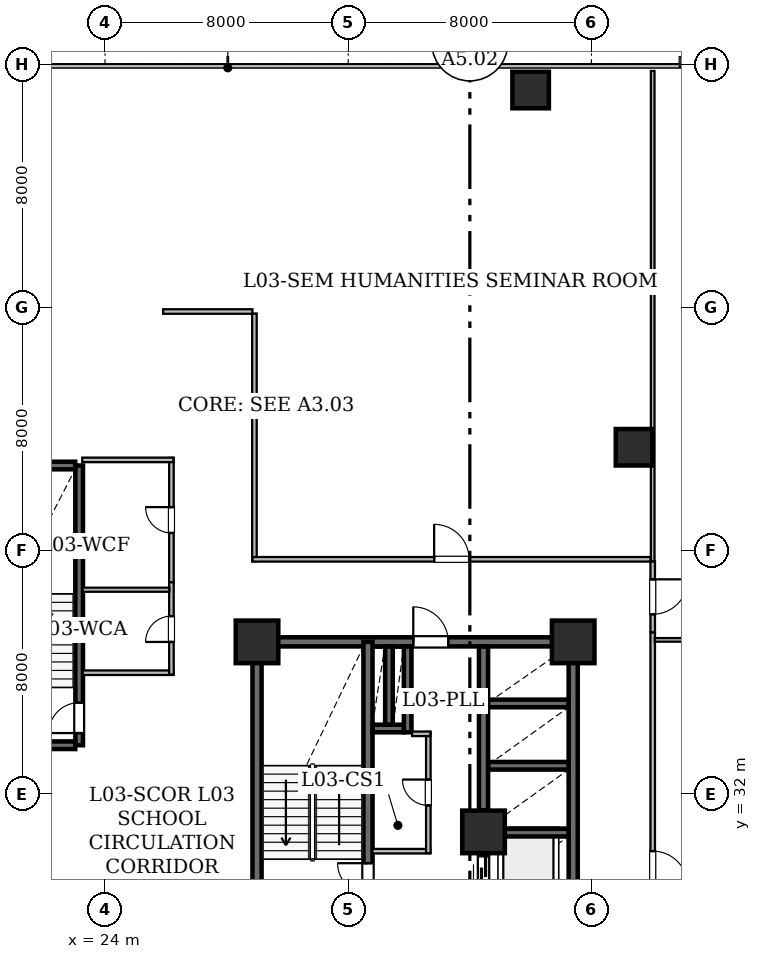
"""IFC4 building model, lengths in metres.
Left out: names, types, materials, properties, quantities, classifications, styles, units other than length and angle.
Written with IfcOpenShell. Run it as: python <this file> out.ifc"""

import sys

from ifc_helpers import new_model, si_unit, direction, frame, frame_2d, origin, origin_2d, place, context, subcontext, project, spatial, rectangle, hollow_rectangle, extrude, element, fill, save


model = new_model("IFC4")
c1 = context("Model", 3, precision=1e-05, world=origin(), true_north=direction((0.0, 1.0)))
c2 = subcontext(c1, "Body", "Model", "MODEL_VIEW")
j1 = project(units=[si_unit("LENGTHUNIT", "METRE"), si_unit("PLANEANGLEUNIT", "RADIAN")], contexts=[c1])
p1 = place(None, origin())
s1 = spatial("IfcSite", under=j1, at=p1, CompositionType="ELEMENT")
p2 = place(p1, origin())
s2 = spatial("IfcBuilding", under=s1, at=p2, CompositionType="ELEMENT")
p3 = place(p2, frame((0.0, 0.0, 16.2)))
s3 = spatial("IfcBuildingStorey", under=s2, at=p3, CompositionType="ELEMENT", Elevation=16.2)
for number, where, z_axis, x_axis in (
    (1, (29.0, 37.0, 0.0), (0.0, 0.0, 1.0), (1.0, 0.0, 0.0)),
    (2, (36.45, 30.75, 0.0), (0.0, 0.0, 1.0), (1.0, 0.0, 0.0)),
    (3, (39.4, 37.0, 0.0), (0.0, 0.0, 1.0), (1.0, 0.0, 0.0)),
):
    element("IfcColumn", number, at=place(p3, frame(where, z_axis=z_axis, x_axis=x_axis)), inside=s3, PredefinedType="COLUMN", context=c2, shape_type="SweptSolid", body=[
        extrude(hollow_rectangle(XDim=1.4, YDim=1.4, WallThickness=0.07, at=origin_2d()), origin(), (0.0, 0.0, 1.0), 4.2),
    ])
for number, where, z_axis, x_axis in (
    (4, (38.0, 55.15, 0.0), (0.0, 0.0, 1.0), (1.0, 0.0, 0.0)),
    (5, (41.4, 43.4, 0.0), (0.0, 0.0, 1.0), (1.0, 0.0, 0.0)),
):
    element("IfcColumn", number, at=place(p3, frame(where, z_axis=z_axis, x_axis=x_axis)), inside=s3, PredefinedType="COLUMN", context=c2, shape_type="SweptSolid", body=[
        extrude(hollow_rectangle(XDim=1.2, YDim=1.2, WallThickness=0.06, at=origin_2d()), origin(), (0.0, 0.0, 1.0), 4.2),
    ])
p4 = place(p3, frame((29.0, 28.0, 0.0), z_axis=(0.0, 0.0, 1.0), x_axis=(0.0, 1.0, 0.0)))
e6 = element("IfcWall", 6, at=p4, inside=s3, PredefinedType="SHEAR", context=c2, shape_type="SweptSolid", body=[
    extrude(rectangle(XDim=9.0, YDim=0.3, at=frame_2d((4.5, 0.0))), origin(), (0.0, 0.0, 1.0), 3.92),
])
p5 = place(p3, frame((29.0, 37.0, 0.0), z_axis=(0.0, 0.0, 1.0), x_axis=(1.0, 0.0, 0.0)))
e7 = element("IfcWall", 7, at=p5, inside=s3, PredefinedType="SHEAR", context=c2, shape_type="SweptSolid", body=[
    extrude(rectangle(XDim=10.4, YDim=0.3, at=frame_2d((5.2, 0.0))), origin(), (0.0, 0.0, 1.0), 3.92),
])
p6 = place(p5, frame((5.14, 0.0, 0.0)))
e8 = element("IfcOpeningElement", 8, at=p6, cuts=e7, PredefinedType="OPENING", context=c2, shape_type="SweptSolid", body=[
    extrude(rectangle(XDim=1.15, YDim=2.2, at=frame_2d((0.575, 1.1))), frame((0.0, 0.16, 0.0), z_axis=(0.0, -1.0, 0.0), x_axis=(1.0, 0.0, 0.0)), (0.0, 0.0, 1.0), 0.32),
])
p7 = place(p3, frame((39.4, 24.4, 0.0), z_axis=(0.0, 0.0, 1.0), x_axis=(0.0, 1.0, 0.0)))
e9 = element("IfcWall", 9, at=p7, inside=s3, PredefinedType="SHEAR", context=c2, shape_type="SweptSolid", body=[
    extrude(rectangle(XDim=12.6, YDim=0.3, at=frame_2d((6.3, 0.0))), origin(), (0.0, 0.0, 1.0), 3.92),
])
p8 = place(p3, frame((32.65, 28.0, 0.0), z_axis=(0.0, 0.0, 1.0), x_axis=(0.0, 1.0, 0.0)))
e10 = element("IfcWall", 10, at=p8, inside=s3, PredefinedType="SHEAR", context=c2, shape_type="SweptSolid", body=[
    extrude(rectangle(XDim=9.0, YDim=0.3, at=frame_2d((4.5, 0.0))), origin(), (0.0, 0.0, 1.0), 3.92),
])
p9 = place(p8, frame((0.72, 0.0, 0.0)))
e11 = element("IfcOpeningElement", 11, at=p9, cuts=e10, PredefinedType="OPENING", context=c2, shape_type="SweptSolid", body=[
    extrude(rectangle(XDim=1.0, YDim=2.15, at=frame_2d((0.5, 1.075))), frame((0.0, 0.16, 0.0), z_axis=(0.0, -1.0, 0.0), x_axis=(1.0, 0.0, 0.0)), (0.0, 0.0, 1.0), 0.32),
])
p10 = place(p3, frame((36.45, 25.1, 0.0), z_axis=(0.0, 0.0, 1.0), x_axis=(0.0, 1.0, 0.0)))
e12 = element("IfcWall", 12, at=p10, inside=s3, PredefinedType="SHEAR", context=c2, shape_type="SweptSolid", body=[
    extrude(rectangle(XDim=4.95, YDim=0.3, at=frame_2d((2.475, 0.0))), origin(), (0.0, 0.0, 1.0), 3.92),
])
p11 = place(p10, frame((0.12, 0.0, 0.0)))
e13 = element("IfcOpeningElement", 13, at=p11, cuts=e12, PredefinedType="OPENING", context=c2, shape_type="SweptSolid", body=[
    extrude(rectangle(XDim=1.05, YDim=2.15, at=frame_2d((0.525, 1.075))), frame((0.0, 0.16, 0.0), z_axis=(0.0, -1.0, 0.0), x_axis=(1.0, 0.0, 0.0)), (0.0, 0.0, 1.0), 0.32),
])
p12 = place(p10, frame((1.995, 0.0, 0.0)))
e14 = element("IfcOpeningElement", 14, at=p12, cuts=e12, PredefinedType="OPENING", context=c2, shape_type="SweptSolid", body=[
    extrude(rectangle(XDim=1.05, YDim=2.15, at=frame_2d((0.525, 1.075))), frame((0.0, 0.16, 0.0), z_axis=(0.0, -1.0, 0.0), x_axis=(1.0, 0.0, 0.0)), (0.0, 0.0, 1.0), 0.32),
])
p13 = place(p10, frame((3.795, 0.0, 0.0)))
e15 = element("IfcOpeningElement", 15, at=p13, cuts=e12, PredefinedType="OPENING", context=c2, shape_type="SweptSolid", body=[
    extrude(rectangle(XDim=1.05, YDim=2.15, at=frame_2d((0.525, 1.075))), frame((0.0, 0.16, 0.0), z_axis=(0.0, -1.0, 0.0), x_axis=(1.0, 0.0, 0.0)), (0.0, 0.0, 1.0), 0.32),
])
p14 = place(p3, frame((36.45, 31.45, 0.0), z_axis=(0.0, 0.0, 1.0), x_axis=(0.0, 1.0, 0.0)))
e16 = element("IfcWall", 16, at=p14, inside=s3, PredefinedType="SHEAR", context=c2, shape_type="SweptSolid", body=[
    extrude(rectangle(XDim=5.396, YDim=0.3, at=frame_2d((2.698, 0.0))), origin(), (0.0, 0.0, 1.0), 3.92),
])
for number, where, z_axis, x_axis in (
    (17, (36.604, 30.725, 0.0), (0.0, 0.0, 1.0), (1.0, 0.0, 0.0)),
    (18, (36.604, 32.925, 0.0), (0.0, 0.0, 1.0), (1.0, 0.0, 0.0)),
    (19, (36.604, 34.975, 0.0), (0.0, 0.0, 1.0), (1.0, 0.0, 0.0)),
):
    element("IfcWall", number, at=place(p3, frame(where, z_axis=z_axis, x_axis=x_axis)), inside=s3, PredefinedType="SHEAR", context=c2, shape_type="SweptSolid", body=[
        extrude(rectangle(XDim=2.642, YDim=0.25, at=frame_2d((1.321, 0.0))), origin(), (0.0, 0.0, 1.0), 3.92),
    ])
p15 = place(p3, frame((33.955, 34.025, 0.0), z_axis=(0.0, 0.0, 1.0), x_axis=(0.0, 1.0, 0.0)))
e20 = element("IfcWall", 20, at=p15, inside=s3, PredefinedType="SHEAR", context=c2, shape_type="SweptSolid", body=[
    extrude(rectangle(XDim=2.821, YDim=0.25, at=frame_2d((1.411, 0.0))), origin(), (0.0, 0.0, 1.0), 3.92),
])
p16 = place(p3, frame((32.804, 34.15, 0.0), z_axis=(0.0, 0.0, 1.0), x_axis=(1.0, 0.0, 0.0)))
e21 = element("IfcWall", 21, at=p16, inside=s3, PredefinedType="SHEAR", context=c2, shape_type="SweptSolid", body=[
    extrude(rectangle(XDim=1.022, YDim=0.25, at=frame_2d((0.511, 0.0))), origin(), (0.0, 0.0, 1.0), 3.92),
])
p17 = place(p3, frame((33.34, 34.279, 0.0), z_axis=(0.0, 0.0, 1.0), x_axis=(0.0, 1.0, 0.0)))
e22 = element("IfcWall", 22, at=p17, inside=s3, PredefinedType="SHEAR", context=c2, shape_type="SweptSolid", body=[
    extrude(rectangle(XDim=2.567, YDim=0.25, at=frame_2d((1.283, 0.0))), origin(), (0.0, 0.0, 1.0), 3.92),
])
p18 = place(p3, frame((23.15, 33.6, 0.0), z_axis=(0.0, 0.0, 1.0), x_axis=(0.0, 1.0, 0.0)))
e23 = element("IfcWall", 23, at=p18, inside=s3, PredefinedType="SHEAR", context=c2, shape_type="SweptSolid", body=[
    extrude(rectangle(XDim=9.2, YDim=0.25, at=frame_2d((4.6, 0.0))), origin(), (0.0, 0.0, 1.0), 3.92),
])
p19 = place(p18, frame((0.4, 0.0, 0.0)))
e24 = element("IfcOpeningElement", 24, at=p19, cuts=e23, PredefinedType="OPENING", context=c2, shape_type="SweptSolid", body=[
    extrude(rectangle(XDim=1.0, YDim=2.15, at=frame_2d((0.5, 1.075))), frame((0.0, 0.135, 0.0), z_axis=(0.0, -1.0, 0.0), x_axis=(1.0, 0.0, 0.0)), (0.0, 0.0, 1.0), 0.27),
])
for number, where, z_axis, x_axis in (
    (25, (19.329, 33.6, 0.0), (0.0, 0.0, 1.0), (1.0, 0.0, 0.0)),
    (26, (19.329, 42.8, 0.0), (0.0, 0.0, 1.0), (1.0, 0.0, 0.0)),
):
    element("IfcWall", number, at=place(p3, frame(where, z_axis=z_axis, x_axis=x_axis)), inside=s3, PredefinedType="SHEAR", context=c2, shape_type="SweptSolid", body=[
        extrude(rectangle(XDim=3.692, YDim=0.25, at=frame_2d((1.846, 0.0))), origin(), (0.0, 0.0, 1.0), 3.92),
    ])
p20 = place(p3, frame((32.794, 30.115, 0.0), z_axis=(0.0, 0.0, 1.0), x_axis=(1.0, 0.0, 0.0)))
e27 = element("IfcWall", 27, at=p20, inside=s3, PredefinedType="STANDARD", context=c2, shape_type="SweptSolid", body=[
    extrude(rectangle(XDim=1.906, YDim=0.15, at=frame_2d((0.953, 0.0))), origin(), (0.0, 0.0, 1.0), 3.377),
])
p21 = place(p3, frame((34.635, 30.052, 0.0), z_axis=(0.0, 0.0, 1.0), x_axis=(0.0, 1.0, 0.0)))
e28 = element("IfcWall", 28, at=p21, inside=s3, PredefinedType="STANDARD", context=c2, shape_type="SweptSolid", body=[
    extrude(rectangle(XDim=3.988, YDim=0.15, at=frame_2d((1.994, 0.0))), origin(), (0.0, 0.0, 1.0), 3.92),
])
p22 = place(p21, frame((1.569, 0.0, 0.0)))
e29 = element("IfcOpeningElement", 29, at=p22, cuts=e28, PredefinedType="OPENING", context=c2, shape_type="SweptSolid", body=[
    extrude(rectangle(XDim=0.85, YDim=2.1, at=frame_2d((0.425, 1.05))), frame((0.0, 0.085, 0.0), z_axis=(0.0, -1.0, 0.0), x_axis=(1.0, 0.0, 0.0)), (0.0, 0.0, 1.0), 0.17),
])
p23 = place(p3, frame((34.7, 33.975, 0.0), z_axis=(0.0, 0.0, 1.0), x_axis=(-1.0, 0.0, 0.0)))
e30 = element("IfcWall", 30, at=p23, inside=s3, PredefinedType="STANDARD", context=c2, shape_type="SweptSolid", body=[
    extrude(rectangle(XDim=0.6, YDim=0.15, at=frame_2d((0.3, 0.0))), origin(), (0.0, 0.0, 1.0), 3.92),
])
p24 = place(p3, frame((23.267, 35.985, 0.0), z_axis=(0.0, 0.0, 1.0), x_axis=(1.0, 0.0, 0.0)))
e31 = element("IfcWall", 31, at=p24, inside=s3, PredefinedType="STANDARD", context=c2, shape_type="SweptSolid", body=[
    extrude(rectangle(XDim=2.983, YDim=0.15, at=frame_2d((1.491, 0.0))), origin(), (0.0, 0.0, 1.0), 3.92),
])
p25 = place(p3, frame((26.185, 35.922, 0.0), z_axis=(0.0, 0.0, 1.0), x_axis=(0.0, 1.0, 0.0)))
e32 = element("IfcWall", 32, at=p25, inside=s3, PredefinedType="STANDARD", context=c2, shape_type="SweptSolid", body=[
    extrude(rectangle(XDim=3.042, YDim=0.15, at=frame_2d((1.521, 0.0))), origin(), (0.0, 0.0, 1.0), 3.92),
])
p26 = place(p25, frame((1.075, 0.0, 0.0)))
e33 = element("IfcOpeningElement", 33, at=p26, cuts=e32, PredefinedType="OPENING", context=c2, shape_type="SweptSolid", body=[
    extrude(rectangle(XDim=0.85, YDim=2.1, at=frame_2d((0.425, 1.05))), frame((0.0, 0.085, 0.0), z_axis=(0.0, -1.0, 0.0), x_axis=(1.0, 0.0, 0.0)), (0.0, 0.0, 1.0), 0.17),
])
p27 = place(p3, frame((26.185, 38.964, 0.0), z_axis=(0.0, 0.0, 1.0), x_axis=(0.0, 1.0, 0.0)))
e34 = element("IfcWall", 34, at=p27, inside=s3, PredefinedType="STANDARD", context=c2, shape_type="SweptSolid", body=[
    extrude(rectangle(XDim=4.086, YDim=0.15, at=frame_2d((2.043, 0.0))), origin(), (0.0, 0.0, 1.0), 3.92),
])
p28 = place(p27, frame((1.618, 0.0, 0.0)))
e35 = element("IfcOpeningElement", 35, at=p28, cuts=e34, PredefinedType="OPENING", context=c2, shape_type="SweptSolid", body=[
    extrude(rectangle(XDim=0.85, YDim=2.1, at=frame_2d((0.425, 1.05))), frame((0.0, 0.085, 0.0), z_axis=(0.0, -1.0, 0.0), x_axis=(1.0, 0.0, 0.0)), (0.0, 0.0, 1.0), 0.17),
])
p29 = place(p3, frame((26.25, 42.985, 0.0), z_axis=(0.0, 0.0, 1.0), x_axis=(-1.0, 0.0, 0.0)))
e36 = element("IfcWall", 36, at=p29, inside=s3, PredefinedType="STANDARD", context=c2, shape_type="SweptSolid", body=[
    extrude(rectangle(XDim=3.0, YDim=0.15, at=frame_2d((1.5, 0.0))), origin(), (0.0, 0.0, 1.0), 3.92),
])
p30 = place(p3, frame((42.015, 37.314, 0.0), z_axis=(0.0, 0.0, 1.0), x_axis=(0.0, -1.0, 0.0)))
e37 = element("IfcWall", 37, at=p30, inside=s3, PredefinedType="STANDARD", context=c2, shape_type="SweptSolid", body=[
    extrude(rectangle(XDim=15.5, YDim=0.15, at=frame_2d((7.75, 0.0))), origin(), (0.0, 0.0, 1.0), 3.055),
])
p31 = place(p30, frame((7.196, 0.0, 0.0)))
e38 = element("IfcOpeningElement", 38, at=p31, cuts=e37, PredefinedType="OPENING", context=c2, shape_type="SweptSolid", body=[
    extrude(rectangle(XDim=1.15, YDim=2.2, at=frame_2d((0.575, 1.1))), frame((0.0, 0.085, 0.0), z_axis=(0.0, -1.0, 0.0), x_axis=(1.0, 0.0, 0.0)), (0.0, 0.0, 1.0), 0.17),
])
p32 = place(p3, frame((42.015, 39.65, 0.0), z_axis=(0.0, 0.0, 1.0), x_axis=(0.0, -1.0, 0.0)))
e39 = element("IfcWall", 39, at=p32, inside=s3, PredefinedType="STANDARD", context=c2, shape_type="SweptSolid", body=[
    extrude(rectangle(XDim=2.336, YDim=0.15, at=frame_2d((1.168, 0.0))), origin(), (0.0, 0.0, 1.0), 3.447),
])
p33 = place(p32, frame((0.593, 0.0, 0.0)))
e40 = element("IfcOpeningElement", 40, at=p33, cuts=e39, PredefinedType="OPENING", context=c2, shape_type="SweptSolid", body=[
    extrude(rectangle(XDim=1.15, YDim=2.2, at=frame_2d((0.575, 1.1))), frame((0.0, 0.085, 0.0), z_axis=(0.0, -1.0, 0.0), x_axis=(1.0, 0.0, 0.0)), (0.0, 0.0, 1.0), 0.17),
])
p34 = place(p3, frame((25.911, 47.865, 0.0), z_axis=(0.0, 0.0, 1.0), x_axis=(1.0, 0.0, 0.0)))
e41 = element("IfcWall", 41, at=p34, inside=s3, PredefinedType="STANDARD", context=c2, shape_type="SweptSolid", body=[
    extrude(rectangle(XDim=2.939, YDim=0.15, at=frame_2d((1.47, 0.0))), origin(), (0.0, 0.0, 1.0), 3.92),
])
p35 = place(p3, frame((28.915, 47.8, 0.0), z_axis=(0.0, 0.0, 1.0), x_axis=(0.0, -1.0, 0.0)))
e42 = element("IfcWall", 42, at=p35, inside=s3, PredefinedType="STANDARD", context=c2, shape_type="SweptSolid", body=[
    extrude(rectangle(XDim=8.15, YDim=0.15, at=frame_2d((4.075, 0.0))), origin(), (0.0, 0.0, 1.0), 3.055),
])
p36 = place(p3, frame((28.852, 39.715, 0.0), z_axis=(0.0, 0.0, 1.0), x_axis=(1.0, 0.0, 0.0)))
e43 = element("IfcWall", 43, at=p36, inside=s3, PredefinedType="STANDARD", context=c2, shape_type="SweptSolid", body=[
    extrude(rectangle(XDim=13.098, YDim=0.15, at=frame_2d((6.549, 0.0))), origin(), (0.0, 0.0, 1.0), 3.055),
])
p37 = place(p36, frame((5.974, 0.0, 0.0)))
e44 = element("IfcOpeningElement", 44, at=p37, cuts=e43, PredefinedType="OPENING", context=c2, shape_type="SweptSolid", body=[
    extrude(rectangle(XDim=1.15, YDim=2.2, at=frame_2d((0.575, 1.1))), frame((0.0, 0.085, 0.0), z_axis=(0.0, -1.0, 0.0), x_axis=(1.0, 0.0, 0.0)), (0.0, 0.0, 1.0), 0.17),
])
p38 = place(p3, frame((23.267, 38.715, 0.0), z_axis=(0.0, 0.0, 1.0), x_axis=(1.0, 0.0, 0.0)))
e45 = element("IfcWall", 45, at=p38, inside=s3, PredefinedType="PARTITIONING", context=c2, shape_type="SweptSolid", body=[
    extrude(rectangle(XDim=2.851, YDim=0.135, at=frame_2d((1.425, 0.0))), origin(), (0.0, 0.0, 1.0), 3.92),
])
p39 = place(p3, frame((42.082, 37.065, 0.0), z_axis=(0.0, 0.0, 1.0), x_axis=(1.0, 0.0, 0.0)))
e46 = element("IfcWall", 46, at=p39, inside=s3, PredefinedType="PARTITIONING", context=c2, shape_type="SweptSolid", body=[
    extrude(rectangle(XDim=13.686, YDim=0.12, at=frame_2d((6.843, 0.0))), origin(), (0.0, 0.0, 1.0), 3.055),
])
p40 = place(p3, frame((42.015, 39.65, 0.0), z_axis=(0.0, 0.0, 1.0), x_axis=(0.0, 1.0, 0.0)))
e47 = element("IfcWall", 47, at=p40, inside=s3, PredefinedType="PARTITIONING", context=c2, shape_type="SweptSolid", body=[
    extrude(rectangle(XDim=16.128, YDim=0.12, at=frame_2d((8.064, 0.0))), origin(), (0.0, 0.0, 1.0), 3.055),
])
p41 = place(p9, origin())
e48 = element("IfcDoor", 48, at=p41, inside=s3, OperationType="SINGLE_SWING_RIGHT", PredefinedType="DOOR", context=c2, shape_type="SweptSolid", body=[
    extrude(rectangle(XDim=1.0, YDim=2.15, at=frame_2d((0.5, 1.075))), frame((0.0, 0.025, 0.0), z_axis=(0.0, -1.0, 0.0), x_axis=(1.0, 0.0, 0.0)), (0.0, 0.0, 1.0), 0.05),
])
fill(e11, e48)
p42 = place(p6, origin())
e49 = element("IfcDoor", 49, at=p42, inside=s3, OperationType="SINGLE_SWING_LEFT", PredefinedType="DOOR", context=c2, shape_type="SweptSolid", body=[
    extrude(rectangle(XDim=1.15, YDim=2.2, at=frame_2d((0.575, 1.1))), frame((0.0, 0.025, 0.0), z_axis=(0.0, -1.0, 0.0), x_axis=(1.0, 0.0, 0.0)), (0.0, 0.0, 1.0), 0.05),
])
fill(e8, e49)
p43 = place(p13, origin())
e50 = element("IfcDoor", 50, at=p43, inside=s3, OperationType="SLIDING_TO_LEFT", PredefinedType="DOOR", context=c2, shape_type="SweptSolid", body=[
    extrude(rectangle(XDim=1.05, YDim=2.15, at=frame_2d((0.525, 1.075))), frame((0.0, 0.025, 0.0), z_axis=(0.0, -1.0, 0.0), x_axis=(1.0, 0.0, 0.0)), (0.0, 0.0, 1.0), 0.05),
])
fill(e15, e50)
p44 = place(p19, origin())
e51 = element("IfcDoor", 51, at=p44, inside=s3, OperationType="SINGLE_SWING_LEFT", PredefinedType="DOOR", context=c2, shape_type="SweptSolid", body=[
    extrude(rectangle(XDim=1.0, YDim=2.15, at=frame_2d((0.5, 1.075))), frame((0.0, 0.025, 0.0), z_axis=(0.0, -1.0, 0.0), x_axis=(1.0, 0.0, 0.0)), (0.0, 0.0, 1.0), 0.05),
])
fill(e24, e51)
p45 = place(p22, origin())
e52 = element("IfcDoor", 52, at=p45, inside=s3, OperationType="SINGLE_SWING_RIGHT", PredefinedType="DOOR", context=c2, shape_type="SweptSolid", body=[
    extrude(rectangle(XDim=0.85, YDim=2.1, at=frame_2d((0.425, 1.05))), frame((0.0, 0.025, 0.0), z_axis=(0.0, -1.0, 0.0), x_axis=(1.0, 0.0, 0.0)), (0.0, 0.0, 1.0), 0.05),
])
fill(e29, e52)
p46 = place(p26, origin())
e53 = element("IfcDoor", 53, at=p46, inside=s3, OperationType="SINGLE_SWING_LEFT", PredefinedType="DOOR", context=c2, shape_type="SweptSolid", body=[
    extrude(rectangle(XDim=0.85, YDim=2.1, at=frame_2d((0.425, 1.05))), frame((0.0, 0.025, 0.0), z_axis=(0.0, -1.0, 0.0), x_axis=(1.0, 0.0, 0.0)), (0.0, 0.0, 1.0), 0.05),
])
fill(e33, e53)
p47 = place(p28, origin())
e54 = element("IfcDoor", 54, at=p47, inside=s3, OperationType="SINGLE_SWING_RIGHT", PredefinedType="DOOR", context=c2, shape_type="SweptSolid", body=[
    extrude(rectangle(XDim=0.85, YDim=2.1, at=frame_2d((0.425, 1.05))), frame((0.0, 0.025, 0.0), z_axis=(0.0, -1.0, 0.0), x_axis=(1.0, 0.0, 0.0)), (0.0, 0.0, 1.0), 0.05),
])
fill(e35, e54)
p48 = place(p31, origin())
e55 = element("IfcDoor", 55, at=p48, inside=s3, OperationType="SINGLE_SWING_RIGHT", PredefinedType="DOOR", context=c2, shape_type="SweptSolid", body=[
    extrude(rectangle(XDim=1.15, YDim=2.2, at=frame_2d((0.575, 1.1))), frame((0.0, 0.025, 0.0), z_axis=(0.0, -1.0, 0.0), x_axis=(1.0, 0.0, 0.0)), (0.0, 0.0, 1.0), 0.05),
])
fill(e38, e55)
p49 = place(p33, origin())
e56 = element("IfcDoor", 56, at=p49, inside=s3, OperationType="SINGLE_SWING_LEFT", PredefinedType="DOOR", context=c2, shape_type="SweptSolid", body=[
    extrude(rectangle(XDim=1.15, YDim=2.2, at=frame_2d((0.575, 1.1))), frame((0.0, 0.025, 0.0), z_axis=(0.0, -1.0, 0.0), x_axis=(1.0, 0.0, 0.0)), (0.0, 0.0, 1.0), 0.05),
])
fill(e40, e56)
p50 = place(p37, origin())
e57 = element("IfcDoor", 57, at=p50, inside=s3, OperationType="SINGLE_SWING_LEFT", PredefinedType="DOOR", context=c2, shape_type="SweptSolid", body=[
    extrude(rectangle(XDim=1.15, YDim=2.2, at=frame_2d((0.575, 1.1))), frame((0.0, 0.025, 0.0), z_axis=(0.0, -1.0, 0.0), x_axis=(1.0, 0.0, 0.0)), (0.0, 0.0, 1.0), 0.05),
])
fill(e44, e57)
save(model, sys.argv[1])
